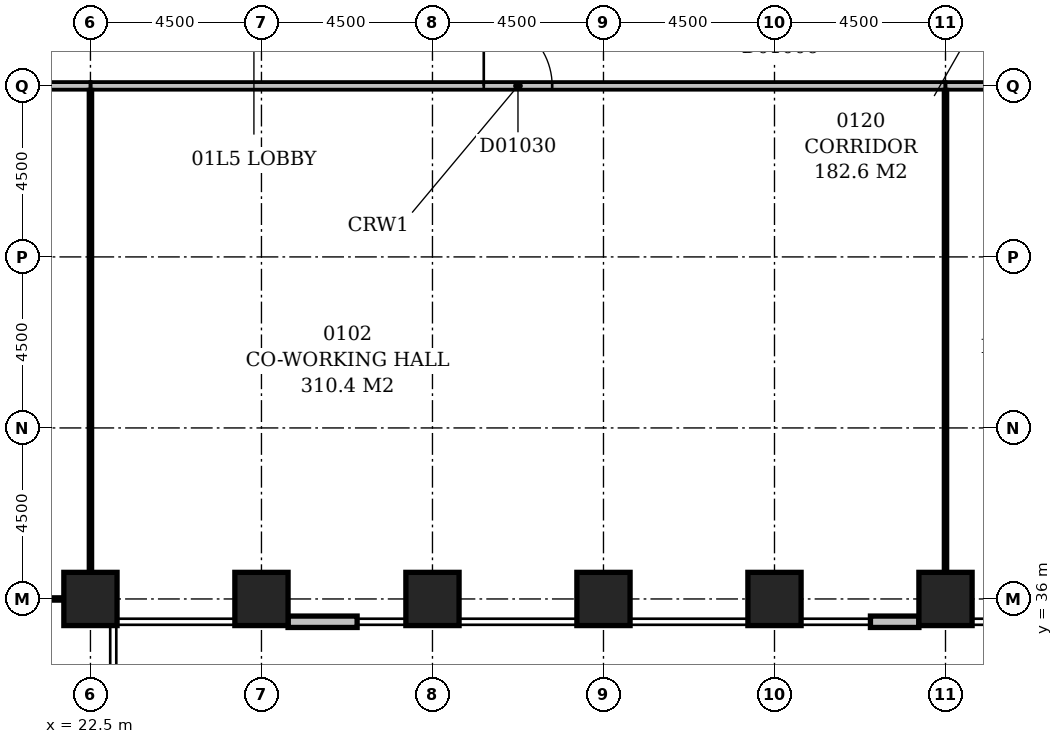
"""IFC4 building model, lengths in metres.
Left out: names, types, materials, properties, quantities, classifications, styles, units other than length and angle.
Written with IfcOpenShell. Run it as: python <this file> out.ifc"""

import sys

from ifc_helpers import new_model, si_unit, direction, frame, frame_2d, origin, origin_2d, place, context, subcontext, project, spatial, rectangle, extrude, element, fill, save


model = new_model("IFC4")
c1 = context("Model", 3, precision=1e-05, world=origin(), true_north=direction((0.0, 1.0)))
c2 = subcontext(c1, "Body", "Model", "MODEL_VIEW")
j1 = project(units=[si_unit("LENGTHUNIT", "METRE"), si_unit("PLANEANGLEUNIT", "RADIAN")], contexts=[c1])
p1 = place(None, origin())
s1 = spatial("IfcSite", under=j1, at=p1, CompositionType="ELEMENT")
p2 = place(p1, origin())
s2 = spatial("IfcBuilding", under=s1, at=p2, CompositionType="ELEMENT")
p3 = place(p2, frame((0.0, 0.0, 9.0)))
s3 = spatial("IfcBuildingStorey", under=s2, at=p3, CompositionType="ELEMENT", Elevation=9.0)
for number, where, z_axis, x_axis in (
    (1, (22.5, 36.0, -0.6), (0.0, 0.0, 1.0), (1.0, 0.0, 0.0)),
    (2, (27.0, 36.0, -0.6), (0.0, 0.0, 1.0), (1.0, 0.0, 0.0)),
    (3, (31.5, 36.0, -0.6), (0.0, 0.0, 1.0), (1.0, 0.0, 0.0)),
    (4, (36.0, 36.0, -0.6), (0.0, 0.0, 1.0), (1.0, 0.0, 0.0)),
    (5, (40.5, 36.0, -0.6), (0.0, 0.0, 1.0), (1.0, 0.0, 0.0)),
    (6, (45.0, 36.0, -0.6), (0.0, 0.0, 1.0), (1.0, 0.0, 0.0)),
):
    element("IfcColumn", number, at=place(p3, frame(where, z_axis=z_axis, x_axis=x_axis)), inside=s3, PredefinedType="COLUMN", context=c2, shape_type="SweptSolid", body=[
        extrude(rectangle(XDim=1.4, YDim=1.4, at=origin_2d()), origin(), (0.0, 0.0, 1.0), 5.2),
    ])
p4 = place(p3, frame((27.7, 35.4, 0.0), z_axis=(0.0, 0.0, 1.0), x_axis=(1.0, 0.0, 0.0)))
e7 = element("IfcWall", 7, at=p4, inside=s3, PredefinedType="STANDARD", context=c2, shape_type="SweptSolid", body=[
    extrude(rectangle(XDim=1.817, YDim=0.3, at=frame_2d((0.909, 0.0))), origin(), (0.0, 0.0, 1.0), 3.9),
])
p5 = place(p3, frame((43.025, 35.4, 0.0), z_axis=(0.0, 0.0, 1.0), x_axis=(1.0, 0.0, 0.0)))
e8 = element("IfcWall", 8, at=p5, inside=s3, PredefinedType="STANDARD", context=c2, shape_type="SweptSolid", body=[
    extrude(rectangle(XDim=1.275, YDim=0.3, at=frame_2d((0.638, 0.0))), origin(), (0.0, 0.0, 1.0), 3.9),
])
p6 = place(p3, frame((22.5, 35.35, 0.0), z_axis=(0.0, 0.0, 1.0), x_axis=(0.0, 1.0, 0.0)))
e9 = element("IfcWall", 9, at=p6, inside=s3, PredefinedType="PARTITIONING", context=c2, shape_type="SweptSolid", body=[
    extrude(rectangle(XDim=0.6, YDim=0.1, at=frame_2d((0.3, 0.0))), origin(), (0.0, 0.0, 1.0), 3.9),
])
p7 = place(p3, frame((22.45, 36.0, 0.0), z_axis=(0.0, 0.0, 1.0), x_axis=(-1.0, 0.0, 0.0)))
e10 = element("IfcWall", 10, at=p7, inside=s3, PredefinedType="PARTITIONING", context=c2, shape_type="SweptSolid", body=[
    extrude(rectangle(XDim=13.35, YDim=0.1, at=frame_2d((6.675, 0.0))), origin(), (0.0, 0.0, 1.0), 3.7),
])
p8 = place(p3, frame((8.9, 49.5, 0.0), z_axis=(0.0, 0.0, 1.0), x_axis=(1.0, 0.0, 0.0)))
e11 = element("IfcWall", 11, at=p8, inside=s3, PredefinedType="PARTITIONING", context=c2, shape_type="SweptSolid", body=[
    extrude(rectangle(XDim=13.6, YDim=0.2, at=frame_2d((6.8, 0.0))), origin(), (0.0, 0.0, 1.0), 4.6),
])
p9 = place(p8, frame((5.925, 0.0, 0.0)))
e12 = element("IfcOpeningElement", 12, at=p9, cuts=e11, PredefinedType="OPENING", context=c2, shape_type="SweptSolid", body=[
    extrude(rectangle(XDim=1.8, YDim=2.4, at=frame_2d((0.9, 1.2))), frame((0.0, 0.112, 0.0), z_axis=(0.0, -1.0, 0.0), x_axis=(1.0, 0.0, 0.0)), (0.0, 0.0, 1.0), 0.224),
])
p10 = place(p3, frame((22.5, 49.4, 0.0), z_axis=(0.0, 0.0, 1.0), x_axis=(0.0, -1.0, 0.0)))
e13 = element("IfcWall", 13, at=p10, inside=s3, PredefinedType="PARTITIONING", context=c2, shape_type="SweptSolid", body=[
    extrude(rectangle(XDim=13.45, YDim=0.1, at=frame_2d((6.725, 0.0))), origin(), (0.0, 0.0, 1.0), 4.6),
])
p11 = place(p3, frame((22.5, 49.5, 0.0), z_axis=(0.0, 0.0, 1.0), x_axis=(1.0, 0.0, 0.0)))
e14 = element("IfcWall", 14, at=p11, inside=s3, PredefinedType="PARTITIONING", context=c2, shape_type="SweptSolid", body=[
    extrude(rectangle(XDim=22.5, YDim=0.2, at=frame_2d((11.25, 0.0))), origin(), (0.0, 0.0, 1.0), 4.6),
])
p12 = place(p11, frame((10.35, 0.0, 0.0)))
e15 = element("IfcOpeningElement", 15, at=p12, cuts=e14, PredefinedType="OPENING", context=c2, shape_type="SweptSolid", body=[
    extrude(rectangle(XDim=1.8, YDim=2.4, at=frame_2d((0.9, 1.2))), frame((0.0, 0.112, 0.0), z_axis=(0.0, -1.0, 0.0), x_axis=(1.0, 0.0, 0.0)), (0.0, 0.0, 1.0), 0.224),
])
p13 = place(p3, frame((45.0, 49.4, 0.0), z_axis=(0.0, 0.0, 1.0), x_axis=(0.0, -1.0, 0.0)))
e16 = element("IfcWall", 16, at=p13, inside=s3, PredefinedType="PARTITIONING", context=c2, shape_type="SweptSolid", body=[
    extrude(rectangle(XDim=13.4, YDim=0.1, at=frame_2d((6.7, 0.0))), origin(), (0.0, 0.0, 1.0), 3.9),
])
p14 = place(p3, frame((45.0, 49.5, 0.0), z_axis=(0.0, 0.0, 1.0), x_axis=(1.0, 0.0, 0.0)))
e17 = element("IfcWall", 17, at=p14, inside=s3, PredefinedType="PARTITIONING", context=c2, shape_type="SweptSolid", body=[
    extrude(rectangle(XDim=4.5, YDim=0.2, at=frame_2d((2.25, 0.0))), origin(), (0.0, 0.0, 1.0), 4.6),
])
p15 = place(p14, frame((1.8, 0.0, 0.0)))
e18 = element("IfcOpeningElement", 18, at=p15, cuts=e17, PredefinedType="OPENING", context=c2, shape_type="SweptSolid", body=[
    extrude(rectangle(XDim=0.9, YDim=2.1, at=frame_2d((0.45, 1.05))), frame((0.0, 0.112, 0.0), z_axis=(0.0, -1.0, 0.0), x_axis=(1.0, 0.0, 0.0)), (0.0, 0.0, 1.0), 0.224),
])
p16 = place(p12, origin())
e19 = element("IfcDoor", 19, at=p16, inside=s3, OperationType="DOUBLE_DOOR_SINGLE_SWING", PredefinedType="DOOR", context=c2, shape_type="SweptSolid", body=[
    extrude(rectangle(XDim=1.8, YDim=2.4, at=frame_2d((0.9, 1.2))), frame((0.0, 0.025, 0.0), z_axis=(0.0, -1.0, 0.0), x_axis=(1.0, 0.0, 0.0)), (0.0, 0.0, 1.0), 0.05),
])
fill(e15, e19)
save(model, sys.argv[1])
